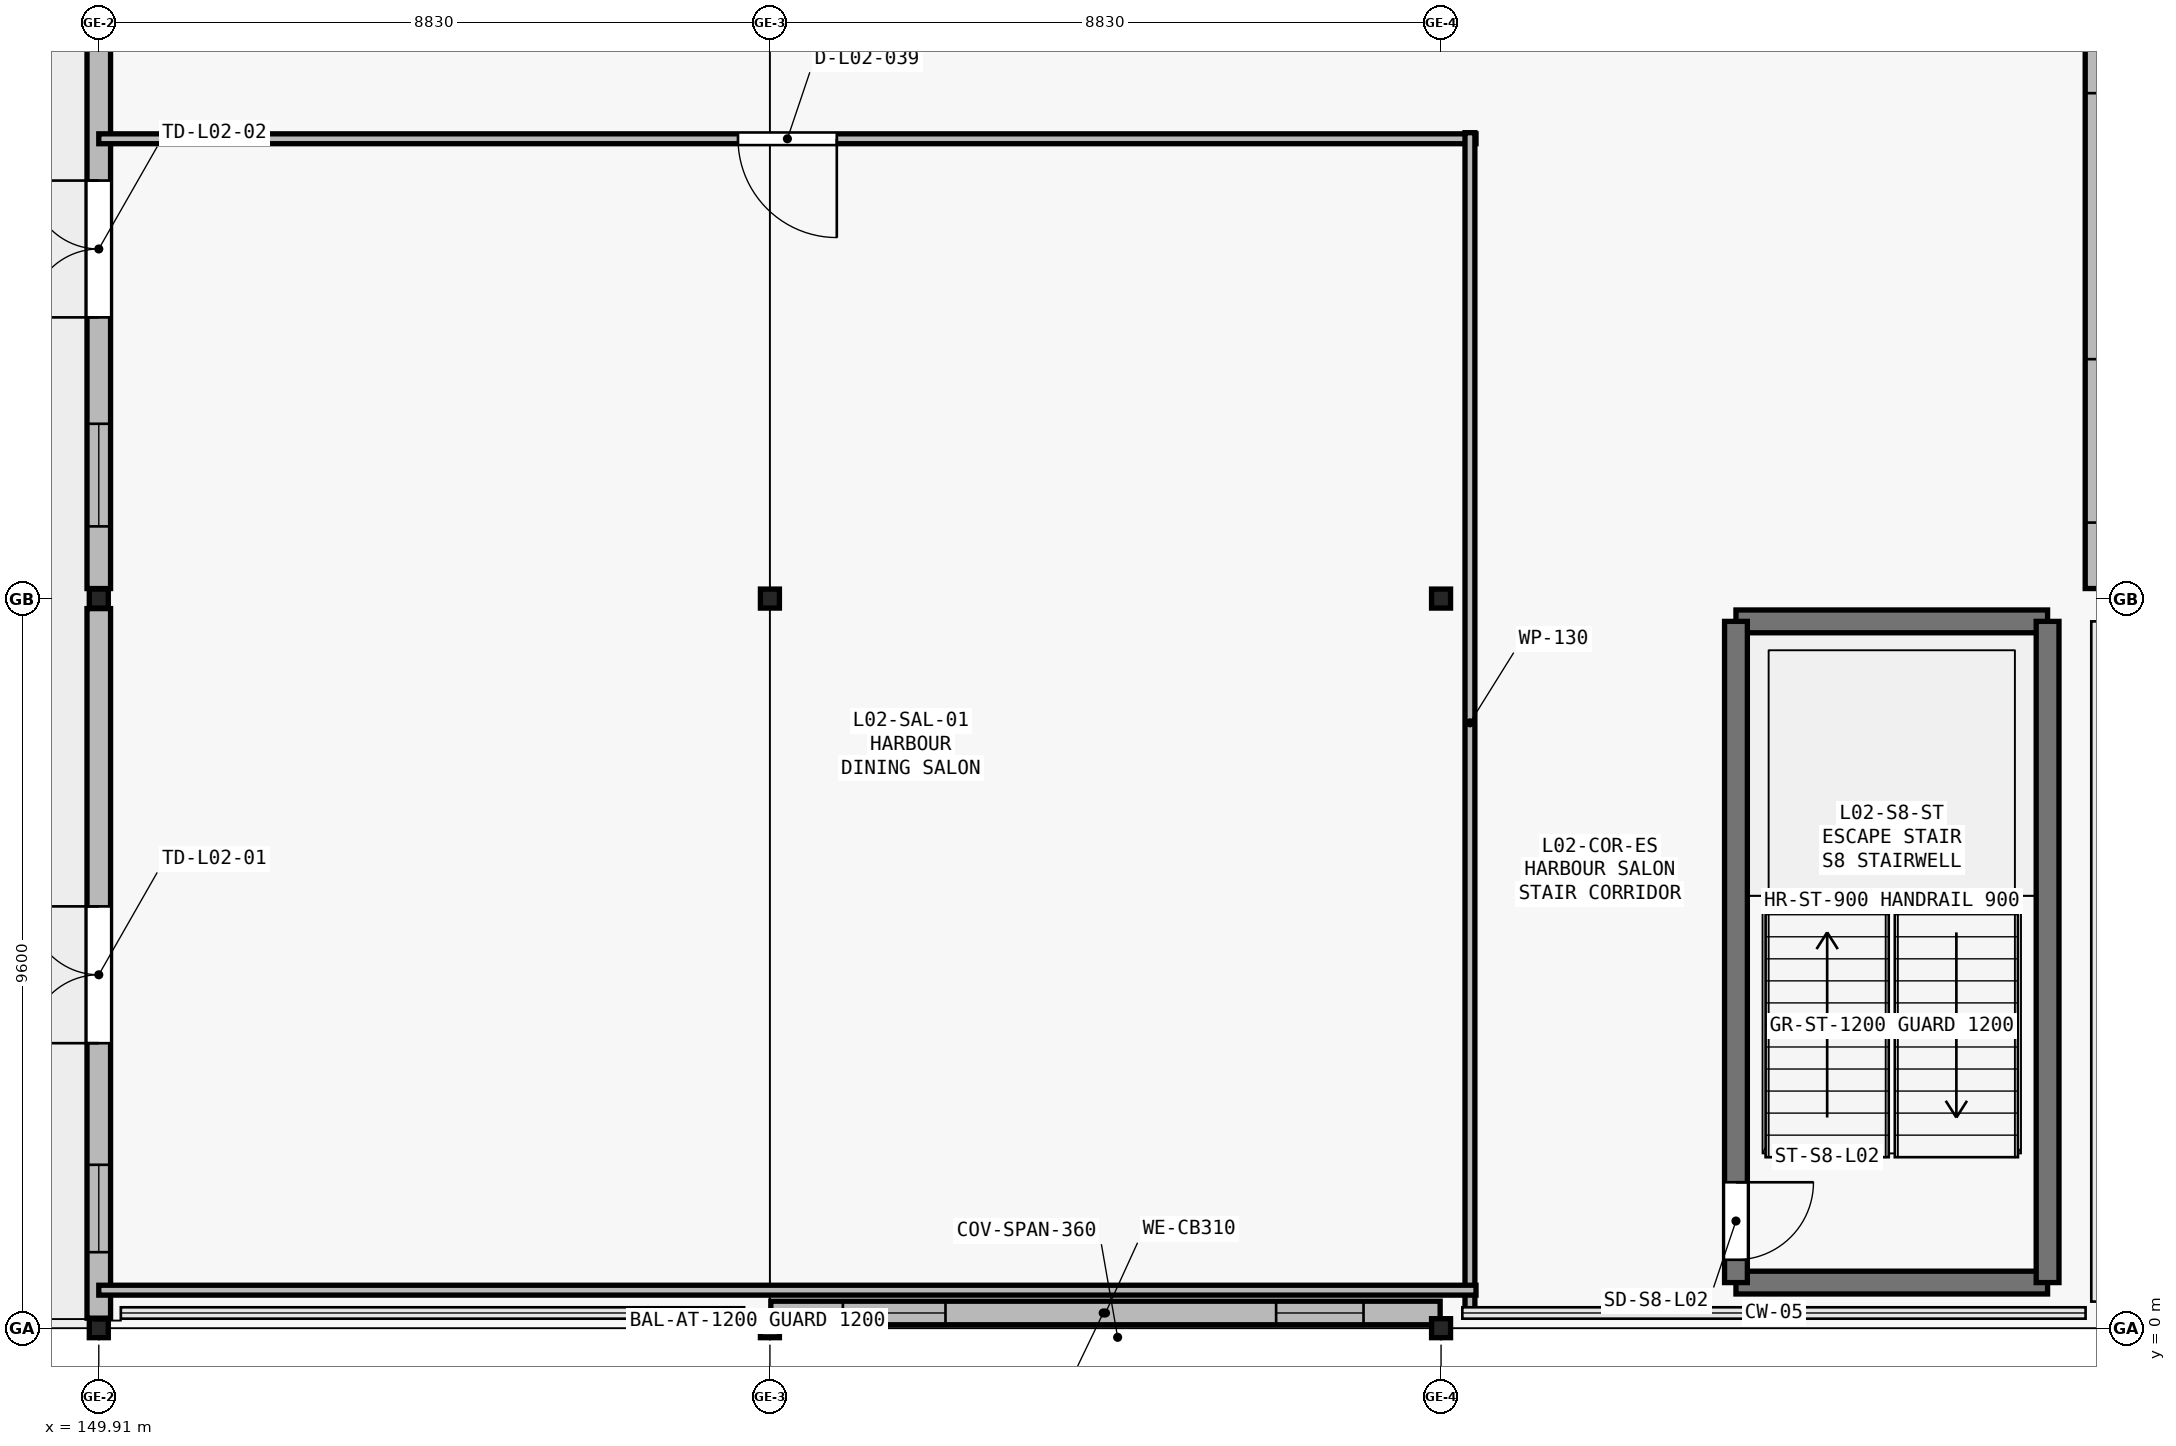
"""IFC4 building model, lengths in metres.
Left out: names, types, materials, properties, quantities, classifications, styles, units other than length and angle.
Written with IfcOpenShell. Run it as: python <this file> out.ifc"""

import sys

from ifc_helpers import new_model, si_unit, direction, frame, frame_2d, origin, origin_2d, place, context, subcontext, project, spatial, rectangle, i_section, extrude, element, fill, save


model = new_model("IFC4")
c1 = context("Model", 3, precision=1e-05, world=origin(), true_north=direction((0.0, 1.0)))
c2 = subcontext(c1, "Body", "Model", "MODEL_VIEW")
j1 = project(units=[si_unit("LENGTHUNIT", "METRE"), si_unit("PLANEANGLEUNIT", "RADIAN")], contexts=[c1])
p1 = place(None, origin())
s1 = spatial("IfcSite", under=j1, at=p1, CompositionType="ELEMENT")
p2 = place(p1, origin())
s2 = spatial("IfcBuilding", under=s1, at=p2, CompositionType="ELEMENT")
p3 = place(p2, frame((0.0, 0.0, 10.8)))
s3 = spatial("IfcBuildingStorey", under=s2, at=p3, CompositionType="ELEMENT", Elevation=10.8)
for number, where, z_axis, x_axis in (
    (1, (149.91, 0.0, 0.0), (0.0, 0.0, 1.0), (1.0, 0.0, 0.0)),
    (2, (149.91, 9.6, 0.0), (0.0, 0.0, 1.0), (1.0, 0.0, 0.0)),
    (3, (158.74, 0.0, 0.0), (0.0, 0.0, 1.0), (1.0, 0.0, 0.0)),
    (4, (158.74, 9.6, 0.0), (0.0, 0.0, 1.0), (1.0, 0.0, 0.0)),
    (5, (167.57, 0.0, 0.0), (0.0, 0.0, 1.0), (1.0, 0.0, 0.0)),
    (6, (167.57, 9.6, 0.0), (0.0, 0.0, 1.0), (1.0, 0.0, 0.0)),
):
    element("IfcColumn", number, at=place(p3, frame(where, z_axis=z_axis, x_axis=x_axis)), inside=s3, PredefinedType="COLUMN", context=c2, shape_type="SweptSolid", body=[
        extrude(i_section(OverallWidth=0.25, OverallDepth=0.25, WebThickness=0.009, FlangeThickness=0.014, FilletRadius=0.016, at=origin_2d()), origin(), (0.0, 0.0, 1.0), 4.2),
    ])
p4 = place(p3, frame((167.558, 0.2, 0.0), z_axis=(0.0, 0.0, 1.0), x_axis=(-1.0, 0.0, 0.0)))
e7 = element("IfcWall", 7, at=p4, inside=s3, PredefinedType="SOLIDWALL", context=c2, shape_type="SweptSolid", body=[
    extrude(rectangle(XDim=8.806, YDim=0.31, at=frame_2d((4.403, 0.0))), origin(), (0.0, 0.0, 1.0), 3.35),
])
p5 = place(p4, frame((1.008, 0.0, 0.95)))
e8 = element("IfcOpeningElement", 8, at=p5, cuts=e7, PredefinedType="OPENING", context=c2, shape_type="SweptSolid", body=[
    extrude(rectangle(XDim=1.15, YDim=1.65, at=frame_2d((0.575, 0.825))), frame((0.0, 0.165, 0.0), z_axis=(0.0, -1.0, 0.0), x_axis=(1.0, 0.0, 0.0)), (0.0, 0.0, 1.0), 0.33),
])
p6 = place(p4, frame((6.508, 0.0, 0.95)))
e9 = element("IfcOpeningElement", 9, at=p6, cuts=e7, PredefinedType="OPENING", context=c2, shape_type="SweptSolid", body=[
    extrude(rectangle(XDim=1.35, YDim=1.65, at=frame_2d((0.675, 0.825))), frame((0.0, 0.165, 0.0), z_axis=(0.0, -1.0, 0.0), x_axis=(1.0, 0.0, 0.0)), (0.0, 0.0, 1.0), 0.33),
])
p7 = place(p3, frame((176.2, 19.068, 0.0), z_axis=(0.0, 0.0, 1.0), x_axis=(0.0, -1.0, 0.0)))
e10 = element("IfcWall", 10, at=p7, inside=s3, PredefinedType="SOLIDWALL", context=c2, shape_type="SweptSolid", body=[
    extrude(rectangle(XDim=9.336, YDim=0.31, at=frame_2d((4.668, 0.0))), origin(), (0.0, 0.0, 1.0), 3.35),
])
p8 = place(p7, frame((0.868, 0.0, 0.95)))
e11 = element("IfcOpeningElement", 11, at=p8, cuts=e10, PredefinedType="OPENING", context=c2, shape_type="SweptSolid", body=[
    extrude(rectangle(XDim=1.95, YDim=1.65, at=frame_2d((0.975, 0.825))), frame((0.0, 0.165, 0.0), z_axis=(0.0, -1.0, 0.0), x_axis=(1.0, 0.0, 0.0)), (0.0, 0.0, 1.0), 0.33),
])
p9 = place(p7, frame((6.318, 0.0, 0.95)))
e12 = element("IfcOpeningElement", 12, at=p9, cuts=e10, PredefinedType="OPENING", context=c2, shape_type="SweptSolid", body=[
    extrude(rectangle(XDim=2.15, YDim=1.65, at=frame_2d((1.075, 0.825))), frame((0.0, 0.165, 0.0), z_axis=(0.0, -1.0, 0.0), x_axis=(1.0, 0.0, 0.0)), (0.0, 0.0, 1.0), 0.33),
])
p10 = place(p3, frame((149.91, 0.132, 0.0), z_axis=(0.0, 0.0, 1.0), x_axis=(0.0, 1.0, 0.0)))
e13 = element("IfcWall", 13, at=p10, inside=s3, PredefinedType="SOLIDWALL", context=c2, shape_type="SweptSolid", body=[
    extrude(rectangle(XDim=9.336, YDim=0.31, at=frame_2d((4.668, 0.0))), origin(), (0.0, 0.0, 1.0), 3.35),
])
p11 = place(p10, frame((3.618, 0.0, 0.0)))
e14 = element("IfcOpeningElement", 14, at=p11, cuts=e13, PredefinedType="OPENING", context=c2, shape_type="SweptSolid", body=[
    extrude(rectangle(XDim=1.8, YDim=2.2, at=frame_2d((0.9, 1.1))), frame((0.0, 0.165, 0.0), z_axis=(0.0, -1.0, 0.0), x_axis=(1.0, 0.0, 0.0)), (0.0, 0.0, 1.0), 0.33),
])
p12 = place(p10, frame((0.868, 0.0, 0.95)))
e15 = element("IfcOpeningElement", 15, at=p12, cuts=e13, PredefinedType="OPENING", context=c2, shape_type="SweptSolid", body=[
    extrude(rectangle(XDim=1.15, YDim=1.65, at=frame_2d((0.575, 0.825))), frame((0.0, 0.165, 0.0), z_axis=(0.0, -1.0, 0.0), x_axis=(1.0, 0.0, 0.0)), (0.0, 0.0, 1.0), 0.33),
])
p13 = place(p3, frame((149.91, 9.732, 0.0), z_axis=(0.0, 0.0, 1.0), x_axis=(0.0, 1.0, 0.0)))
e16 = element("IfcWall", 16, at=p13, inside=s3, PredefinedType="SOLIDWALL", context=c2, shape_type="SweptSolid", body=[
    extrude(rectangle(XDim=9.336, YDim=0.31, at=frame_2d((4.668, 0.0))), origin(), (0.0, 0.0, 1.0), 3.35),
])
p14 = place(p13, frame((3.568, 0.0, 0.0)))
e17 = element("IfcOpeningElement", 17, at=p14, cuts=e16, PredefinedType="OPENING", context=c2, shape_type="SweptSolid", body=[
    extrude(rectangle(XDim=1.8, YDim=2.2, at=frame_2d((0.9, 1.1))), frame((0.0, 0.165, 0.0), z_axis=(0.0, -1.0, 0.0), x_axis=(1.0, 0.0, 0.0)), (0.0, 0.0, 1.0), 0.33),
])
p15 = place(p13, frame((0.818, 0.0, 0.95)))
e18 = element("IfcOpeningElement", 18, at=p15, cuts=e16, PredefinedType="OPENING", context=c2, shape_type="SweptSolid", body=[
    extrude(rectangle(XDim=1.35, YDim=1.65, at=frame_2d((0.675, 0.825))), frame((0.0, 0.165, 0.0), z_axis=(0.0, -1.0, 0.0), x_axis=(1.0, 0.0, 0.0)), (0.0, 0.0, 1.0), 0.33),
])
for number, where, z_axis, x_axis in (
    (19, (171.45, 0.6, 0.0), (0.0, 0.0, 1.0), (1.0, 0.0, 0.0)),
    (20, (175.55, 9.3, 0.0), (0.0, 0.0, 1.0), (-1.0, 0.0, 0.0)),
):
    element("IfcWall", number, at=place(p3, frame(where, z_axis=z_axis, x_axis=x_axis)), inside=s3, PredefinedType="SHEAR", context=c2, shape_type="SweptSolid", body=[
        extrude(rectangle(XDim=4.1, YDim=0.3, at=frame_2d((2.05, 0.0))), origin(), (0.0, 0.0, 1.0), 4.2),
    ])
p16 = place(p3, frame((171.45, 9.3, 0.0), z_axis=(0.0, 0.0, 1.0), x_axis=(0.0, -1.0, 0.0)))
e21 = element("IfcWall", 21, at=p16, inside=s3, PredefinedType="SHEAR", context=c2, shape_type="SweptSolid", body=[
    extrude(rectangle(XDim=8.7, YDim=0.3, at=frame_2d((4.35, 0.0))), origin(), (0.0, 0.0, 1.0), 4.2),
])
p17 = place(p16, frame((7.38, 0.0, 0.0)))
e22 = element("IfcOpeningElement", 22, at=p17, cuts=e21, PredefinedType="OPENING", context=c2, shape_type="SweptSolid", body=[
    extrude(rectangle(XDim=1.02, YDim=2.1, at=frame_2d((0.51, 1.05))), frame((0.0, 0.16, 0.0), z_axis=(0.0, -1.0, 0.0), x_axis=(1.0, 0.0, 0.0)), (0.0, 0.0, 1.0), 0.32),
])
p18 = place(p3, frame((175.55, 0.6, 0.0), z_axis=(0.0, 0.0, 1.0), x_axis=(0.0, 1.0, 0.0)))
e23 = element("IfcWall", 23, at=p18, inside=s3, PredefinedType="SHEAR", context=c2, shape_type="SweptSolid", body=[
    extrude(rectangle(XDim=8.7, YDim=0.3, at=frame_2d((4.35, 0.0))), origin(), (0.0, 0.0, 1.0), 4.2),
])
p19 = place(p3, frame((168.03, 15.65, 0.0), z_axis=(0.0, 0.0, 1.0), x_axis=(-1.0, 0.0, 0.0)))
e24 = element("IfcWall", 24, at=p19, inside=s3, PredefinedType="PARTITIONING", context=c2, shape_type="SweptSolid", body=[
    extrude(rectangle(XDim=18.12, YDim=0.13, at=frame_2d((9.06, 0.0))), origin(), (0.0, 0.0, 1.0), 3.72),
])
p20 = place(p19, frame((8.41, 0.0, 0.0)))
e25 = element("IfcOpeningElement", 25, at=p20, cuts=e24, PredefinedType="OPENING", context=c2, shape_type="SweptSolid", body=[
    extrude(rectangle(XDim=1.3, YDim=2.36, at=frame_2d((0.65, 1.18))), frame((0.0, 0.075, 0.0), z_axis=(0.0, -1.0, 0.0), x_axis=(1.0, 0.0, 0.0)), (0.0, 0.0, 1.0), 0.15),
])
p21 = place(p3, frame((167.95, 0.2, 0.0), z_axis=(0.0, 0.0, 1.0), x_axis=(0.0, 1.0, 0.0)))
e26 = element("IfcWall", 26, at=p21, inside=s3, PredefinedType="PARTITIONING", context=c2, shape_type="SweptSolid", body=[
    extrude(rectangle(XDim=15.53, YDim=0.13, at=frame_2d((7.765, 0.0))), origin(), (0.0, 0.0, 1.0), 3.72),
])
p22 = place(p3, frame((149.91, 0.5, 0.0), z_axis=(0.0, 0.0, 1.0), x_axis=(1.0, 0.0, 0.0)))
e27 = element("IfcWall", 27, at=p22, inside=s3, PredefinedType="PARTITIONING", context=c2, shape_type="SweptSolid", body=[
    extrude(rectangle(XDim=18.12, YDim=0.13, at=frame_2d((9.06, 0.0))), origin(), (0.0, 0.0, 1.0), 3.72),
])
p23 = place(p5, origin())
e28 = element("IfcWindow", 28, at=p23, inside=s3, PartitioningType="SINGLE_PANEL", PredefinedType="WINDOW", context=c2, shape_type="SweptSolid", body=[
    extrude(rectangle(XDim=1.15, YDim=1.65, at=frame_2d((0.575, 0.825))), frame((0.0, 0.03, 0.0), z_axis=(0.0, -1.0, 0.0), x_axis=(1.0, 0.0, 0.0)), (0.0, 0.0, 1.0), 0.06),
])
fill(e8, e28)
p24 = place(p6, origin())
e29 = element("IfcWindow", 29, at=p24, inside=s3, PartitioningType="SINGLE_PANEL", PredefinedType="WINDOW", context=c2, shape_type="SweptSolid", body=[
    extrude(rectangle(XDim=1.35, YDim=1.65, at=frame_2d((0.675, 0.825))), frame((0.0, 0.03, 0.0), z_axis=(0.0, -1.0, 0.0), x_axis=(1.0, 0.0, 0.0)), (0.0, 0.0, 1.0), 0.06),
])
fill(e9, e29)
p25 = place(p8, origin())
e30 = element("IfcWindow", 30, at=p25, inside=s3, PartitioningType="SINGLE_PANEL", PredefinedType="WINDOW", context=c2, shape_type="SweptSolid", body=[
    extrude(rectangle(XDim=1.95, YDim=1.65, at=frame_2d((0.975, 0.825))), frame((0.0, 0.03, 0.0), z_axis=(0.0, -1.0, 0.0), x_axis=(1.0, 0.0, 0.0)), (0.0, 0.0, 1.0), 0.06),
])
fill(e11, e30)
p26 = place(p9, origin())
e31 = element("IfcWindow", 31, at=p26, inside=s3, PartitioningType="SINGLE_PANEL", PredefinedType="WINDOW", context=c2, shape_type="SweptSolid", body=[
    extrude(rectangle(XDim=2.15, YDim=1.65, at=frame_2d((1.075, 0.825))), frame((0.0, 0.03, 0.0), z_axis=(0.0, -1.0, 0.0), x_axis=(1.0, 0.0, 0.0)), (0.0, 0.0, 1.0), 0.06),
])
fill(e12, e31)
p27 = place(p11, origin())
e32 = element("IfcDoor", 32, at=p27, inside=s3, OperationType="DOUBLE_DOOR_SINGLE_SWING", PredefinedType="DOOR", context=c2, shape_type="SweptSolid", body=[
    extrude(rectangle(XDim=1.8, YDim=2.2, at=frame_2d((0.9, 1.1))), frame((0.0, 0.025, 0.0), z_axis=(0.0, -1.0, 0.0), x_axis=(1.0, 0.0, 0.0)), (0.0, 0.0, 1.0), 0.05),
])
fill(e14, e32)
p28 = place(p12, origin())
e33 = element("IfcWindow", 33, at=p28, inside=s3, PartitioningType="SINGLE_PANEL", PredefinedType="WINDOW", context=c2, shape_type="SweptSolid", body=[
    extrude(rectangle(XDim=1.15, YDim=1.65, at=frame_2d((0.575, 0.825))), frame((0.0, 0.03, 0.0), z_axis=(0.0, -1.0, 0.0), x_axis=(1.0, 0.0, 0.0)), (0.0, 0.0, 1.0), 0.06),
])
fill(e15, e33)
p29 = place(p14, origin())
e34 = element("IfcDoor", 34, at=p29, inside=s3, OperationType="DOUBLE_DOOR_SINGLE_SWING", PredefinedType="DOOR", context=c2, shape_type="SweptSolid", body=[
    extrude(rectangle(XDim=1.8, YDim=2.2, at=frame_2d((0.9, 1.1))), frame((0.0, 0.025, 0.0), z_axis=(0.0, -1.0, 0.0), x_axis=(1.0, 0.0, 0.0)), (0.0, 0.0, 1.0), 0.05),
])
fill(e17, e34)
p30 = place(p15, origin())
e35 = element("IfcWindow", 35, at=p30, inside=s3, PartitioningType="SINGLE_PANEL", PredefinedType="WINDOW", context=c2, shape_type="SweptSolid", body=[
    extrude(rectangle(XDim=1.35, YDim=1.65, at=frame_2d((0.675, 0.825))), frame((0.0, 0.03, 0.0), z_axis=(0.0, -1.0, 0.0), x_axis=(1.0, 0.0, 0.0)), (0.0, 0.0, 1.0), 0.06),
])
fill(e18, e35)
p31 = place(p17, origin())
e36 = element("IfcDoor", 36, at=p31, inside=s3, OperationType="SINGLE_SWING_LEFT", PredefinedType="DOOR", context=c2, shape_type="SweptSolid", body=[
    extrude(rectangle(XDim=1.02, YDim=2.1, at=frame_2d((0.51, 1.05))), frame((0.0, 0.025, 0.0), z_axis=(0.0, -1.0, 0.0), x_axis=(1.0, 0.0, 0.0)), (0.0, 0.0, 1.0), 0.05),
])
fill(e22, e36)
p32 = place(p20, origin())
e37 = element("IfcDoor", 37, at=p32, inside=s3, OperationType="SINGLE_SWING_LEFT", PredefinedType="DOOR", context=c2, shape_type="SweptSolid", body=[
    extrude(rectangle(XDim=1.3, YDim=2.36, at=frame_2d((0.65, 1.18))), frame((0.0, 0.025, 0.0), z_axis=(0.0, -1.0, 0.0), x_axis=(1.0, 0.0, 0.0)), (0.0, 0.0, 1.0), 0.05),
])
fill(e25, e37)
save(model, sys.argv[1])
